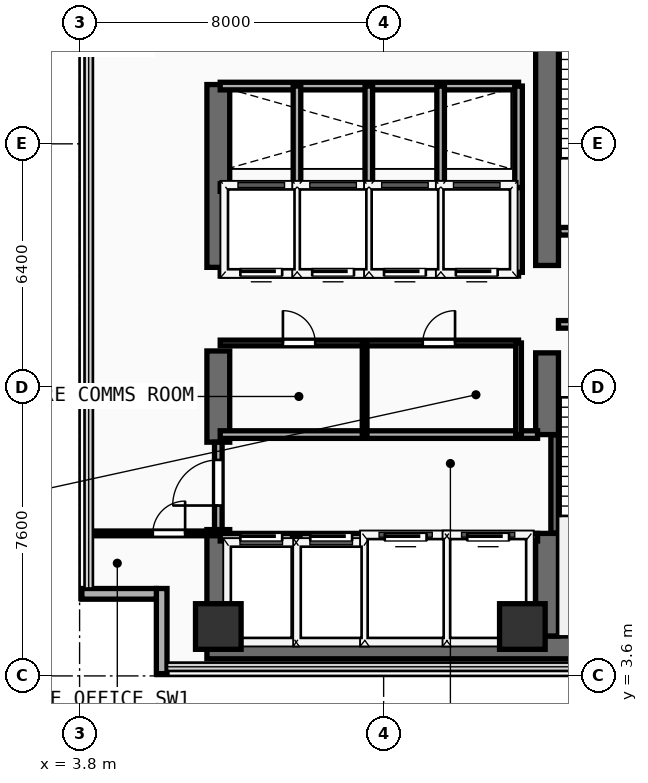
"""IFC4 building model, lengths in metres.
Left out: names, types, materials, properties, quantities, classifications, styles, units other than length and angle.
Written with IfcOpenShell. Run it as: python <this file> out.ifc"""

import sys

from ifc_helpers import new_model, si_unit, direction, frame, frame_2d, origin, origin_2d, place, context, subcontext, project, spatial, rectangle, extrude, element, fill, save


model = new_model("IFC4")
c1 = context("Model", 3, precision=1e-05, world=origin(), true_north=direction((0.0, 1.0)))
c2 = subcontext(c1, "Body", "Model", "MODEL_VIEW")
j1 = project(units=[si_unit("LENGTHUNIT", "METRE"), si_unit("PLANEANGLEUNIT", "RADIAN")], contexts=[c1])
p1 = place(None, origin())
s1 = spatial("IfcSite", under=j1, at=p1, CompositionType="ELEMENT")
p2 = place(p1, origin())
s2 = spatial("IfcBuilding", under=s1, at=p2, CompositionType="ELEMENT")
p3 = place(p2, frame((0.0, 0.0, 153.8)))
s3 = spatial("IfcBuildingStorey", under=s2, at=p3, CompositionType="ELEMENT", Elevation=153.8)
p4 = place(p3, frame((7.15, 4.35, 0.0), z_axis=(0.0, 0.0, 1.0), x_axis=(1.0, 0.0, 0.0)))
e1 = element("IfcWall", 1, at=p4, inside=s3, PredefinedType="SHEAR", context=c2, shape_type="SweptSolid", body=[
    extrude(rectangle(XDim=13.95, YDim=0.6, at=frame_2d((6.975, 0.0))), origin(), (0.0, 0.0, 1.0), 3.56),
])
p5 = place(p3, frame((7.45, 4.65, 0.0), z_axis=(0.0, 0.0, 1.0), x_axis=(0.0, 1.0, 0.0)))
e2 = element("IfcWall", 2, at=p5, inside=s3, PredefinedType="SHEAR", context=c2, shape_type="SweptSolid", body=[
    extrude(rectangle(XDim=2.8, YDim=0.6, at=frame_2d((1.4, 0.0))), origin(), (0.0, 0.0, 1.0), 3.56),
])
p6 = place(p3, frame((7.45, 9.75, 0.0), z_axis=(0.0, 0.0, 1.0), x_axis=(0.0, 1.0, 0.0)))
e3 = element("IfcWall", 3, at=p6, inside=s3, PredefinedType="SHEAR", context=c2, shape_type="SweptSolid", body=[
    extrude(rectangle(XDim=2.4, YDim=0.6, at=frame_2d((1.2, 0.0))), origin(), (0.0, 0.0, 1.0), 3.56),
])
p7 = place(p3, frame((7.45, 14.35, 0.0), z_axis=(0.0, 0.0, 1.0), x_axis=(0.0, 1.0, 0.0)))
e4 = element("IfcWall", 4, at=p7, inside=s3, PredefinedType="SHEAR", context=c2, shape_type="SweptSolid", body=[
    extrude(rectangle(XDim=4.81, YDim=0.6, at=frame_2d((2.405, 0.0))), origin(), (0.0, 0.0, 1.0), 3.56),
])
p8 = place(p3, frame((16.1, 4.65, 0.0), z_axis=(0.0, 0.0, 1.0), x_axis=(0.0, 1.0, 0.0)))
e5 = element("IfcWall", 5, at=p8, inside=s3, PredefinedType="SHEAR", context=c2, shape_type="SweptSolid", body=[
    extrude(rectangle(XDim=2.7, YDim=0.6, at=frame_2d((1.35, 0.0))), origin(), (0.0, 0.0, 1.0), 3.56),
])
p9 = place(p3, frame((16.1, 9.95, 0.0), z_axis=(0.0, 0.0, 1.0), x_axis=(0.0, 1.0, 0.0)))
e6 = element("IfcWall", 6, at=p9, inside=s3, PredefinedType="SHEAR", context=c2, shape_type="SweptSolid", body=[
    extrude(rectangle(XDim=2.15, YDim=0.6, at=frame_2d((1.075, 0.0))), origin(), (0.0, 0.0, 1.0), 3.56),
])
p10 = place(p3, frame((16.1, 14.4, 0.0), z_axis=(0.0, 0.0, 1.0), x_axis=(0.0, 1.0, 0.0)))
e7 = element("IfcWall", 7, at=p10, inside=s3, PredefinedType="SHEAR", context=c2, shape_type="SweptSolid", body=[
    extrude(rectangle(XDim=9.1, YDim=0.6, at=frame_2d((4.55, 0.0))), origin(), (0.0, 0.0, 1.0), 3.56),
])
for number, where, z_axis, x_axis in (
    (8, (7.45, 4.9, 0.0), (0.0, 0.0, 1.0), (1.0, 0.0, 0.0)),
    (9, (15.45, 4.9, 0.0), (0.0, 0.0, 1.0), (1.0, 0.0, 0.0)),
):
    element("IfcColumn", number, at=place(p3, frame(where, z_axis=z_axis, x_axis=x_axis)), inside=s3, PredefinedType="COLUMN", context=c2, shape_type="SweptSolid", body=[
        extrude(rectangle(XDim=1.2, YDim=1.2, at=origin_2d()), origin(), (0.0, 0.0, 1.0), 3.56),
    ])
p11 = place(p3, frame((5.96, 3.66, 0.0), z_axis=(0.0, 0.0, 1.0), x_axis=(0.0, 1.0, 0.0)))
e10 = element("IfcWall", 10, at=p11, inside=s3, PredefinedType="SOLIDWALL", context=c2, shape_type="SweptSolid", body=[
    extrude(rectangle(XDim=2.24, YDim=0.28, at=frame_2d((1.12, 0.0))), origin(), (0.0, 0.0, 1.0), 3.56),
])
p12 = place(p3, frame((3.86, 5.76, 0.0), z_axis=(0.0, 0.0, 1.0), x_axis=(1.0, 0.0, 0.0)))
e11 = element("IfcWall", 11, at=p12, inside=s3, PredefinedType="SOLIDWALL", context=c2, shape_type="SweptSolid", body=[
    extrude(rectangle(XDim=1.96, YDim=0.28, at=frame_2d((0.98, 0.0))), origin(), (0.0, 0.0, 1.0), 3.56),
])
p13 = place(p3, frame((16.3, 7.36, 0.0), z_axis=(0.0, 0.0, 1.0), x_axis=(0.0, 1.0, 0.0)))
e12 = element("IfcWall", 12, at=p13, inside=s3, PredefinedType="SHEAR", context=c2, shape_type="SweptSolid", body=[
    extrude(rectangle(XDim=2.58, YDim=0.2, at=frame_2d((1.29, 0.0))), origin(), (0.0, 0.0, 1.0), 3.56),
])
p14 = place(p3, frame((16.4, 12.85, 0.0), z_axis=(0.0, 0.0, 1.0), x_axis=(1.0, 0.0, 0.0)))
e13 = element("IfcWall", 13, at=p14, inside=s3, PredefinedType="PARTITIONING", context=c2, shape_type="SweptSolid", body=[
    extrude(rectangle(XDim=3.96, YDim=0.2, at=frame_2d((1.98, 0.0))), origin(), (0.0, 0.0, 1.0), 3.56),
])
p15 = place(p14, frame((1.304, 0.0, 0.0)))
e14 = element("IfcOpeningElement", 14, at=p15, cuts=e13, PredefinedType="OPENING", context=c2, shape_type="SweptSolid", body=[
    extrude(rectangle(XDim=1.1, YDim=2.2, at=frame_2d((0.55, 1.1))), frame((0.0, 0.11, 0.0), z_axis=(0.0, -1.0, 0.0), x_axis=(1.0, 0.0, 0.0)), (0.0, 0.0, 1.0), 0.22),
])
p16 = place(p3, frame((16.41, 15.3, 0.0), z_axis=(0.0, 0.0, 1.0), x_axis=(1.0, 0.0, 0.0)))
e15 = element("IfcWall", 15, at=p16, inside=s3, PredefinedType="PARTITIONING", context=c2, shape_type="SweptSolid", body=[
    extrude(rectangle(XDim=3.95, YDim=0.2, at=frame_2d((1.975, 0.0))), origin(), (0.0, 0.0, 1.0), 3.56),
])
p17 = place(p16, frame((1.294, 0.0, 0.0)))
e16 = element("IfcOpeningElement", 16, at=p17, cuts=e15, PredefinedType="OPENING", context=c2, shape_type="SweptSolid", body=[
    extrude(rectangle(XDim=1.1, YDim=2.2, at=frame_2d((0.55, 1.1))), frame((0.0, 0.11, 0.0), z_axis=(0.0, -1.0, 0.0), x_axis=(1.0, 0.0, 0.0)), (0.0, 0.0, 1.0), 0.22),
])
p18 = place(p3, frame((7.5, 7.25, 0.0), z_axis=(0.0, 0.0, 1.0), x_axis=(1.0, 0.0, 0.0)))
e17 = element("IfcWall", 17, at=p18, inside=s3, PredefinedType="PARTITIONING", context=c2, shape_type="SweptSolid", body=[
    extrude(rectangle(XDim=8.35, YDim=0.2, at=frame_2d((4.175, 0.0))), origin(), (0.0, 0.0, 1.0), 3.56),
])
p19 = place(p18, frame((0.53, 0.0, 0.0)))
e18 = element("IfcOpeningElement", 18, at=p19, cuts=e17, PredefinedType="OPENING", context=c2, shape_type="SweptSolid", body=[
    extrude(rectangle(XDim=1.1, YDim=2.2, at=frame_2d((0.55, 1.1))), frame((0.0, 0.11, 0.0), z_axis=(0.0, -1.0, 0.0), x_axis=(1.0, 0.0, 0.0)), (0.0, 0.0, 1.0), 0.22),
])
p20 = place(p18, frame((2.37, 0.0, 0.0)))
e19 = element("IfcOpeningElement", 19, at=p20, cuts=e17, PredefinedType="OPENING", context=c2, shape_type="SweptSolid", body=[
    extrude(rectangle(XDim=1.1, YDim=2.2, at=frame_2d((0.55, 1.1))), frame((0.0, 0.11, 0.0), z_axis=(0.0, -1.0, 0.0), x_axis=(1.0, 0.0, 0.0)), (0.0, 0.0, 1.0), 0.22),
])
p21 = place(p18, frame((4.33, 0.0, 0.0)))
e20 = element("IfcOpeningElement", 20, at=p21, cuts=e17, PredefinedType="OPENING", context=c2, shape_type="SweptSolid", body=[
    extrude(rectangle(XDim=1.1, YDim=2.2, at=frame_2d((0.55, 1.1))), frame((0.0, 0.11, 0.0), z_axis=(0.0, -1.0, 0.0), x_axis=(1.0, 0.0, 0.0)), (0.0, 0.0, 1.0), 0.22),
])
p22 = place(p18, frame((6.5, 0.0, 0.0)))
e21 = element("IfcOpeningElement", 21, at=p22, cuts=e17, PredefinedType="OPENING", context=c2, shape_type="SweptSolid", body=[
    extrude(rectangle(XDim=1.1, YDim=2.2, at=frame_2d((0.55, 1.1))), frame((0.0, 0.11, 0.0), z_axis=(0.0, -1.0, 0.0), x_axis=(1.0, 0.0, 0.0)), (0.0, 0.0, 1.0), 0.22),
])
p23 = place(p3, frame((7.5, 9.95, 0.0), z_axis=(0.0, 0.0, 1.0), x_axis=(1.0, 0.0, 0.0)))
e22 = element("IfcWall", 22, at=p23, inside=s3, PredefinedType="PARTITIONING", context=c2, shape_type="SweptSolid", body=[
    extrude(rectangle(XDim=8.35, YDim=0.2, at=frame_2d((4.175, 0.0))), origin(), (0.0, 0.0, 1.0), 3.56),
])
for number, where, z_axis, x_axis in (
    (23, (9.5, 4.45, 0.0), (0.0, 0.0, 1.0), (0.0, 1.0, 0.0)),
    (24, (11.36, 4.45, 0.0), (0.0, 0.0, 1.0), (0.0, 1.0, 0.0)),
    (25, (13.46, 4.45, 0.0), (0.0, 0.0, 1.0), (0.0, 1.0, 0.0)),
):
    element("IfcWall", number, at=place(p3, frame(where, z_axis=z_axis, x_axis=x_axis)), inside=s3, PredefinedType="PARTITIONING", context=c2, shape_type="SweptSolid", body=[
        extrude(rectangle(XDim=2.8, YDim=0.2, at=frame_2d((1.4, 0.0))), origin(), (0.0, 0.0, 1.0), 3.56),
    ])
p24 = place(p3, frame((7.45, 7.45, 0.0), z_axis=(0.0, 0.0, 1.0), x_axis=(0.0, 1.0, 0.0)))
e26 = element("IfcWall", 26, at=p24, inside=s3, PredefinedType="PARTITIONING", context=c2, shape_type="SweptSolid", body=[
    extrude(rectangle(XDim=2.3, YDim=0.2, at=frame_2d((1.15, 0.0))), origin(), (0.0, 0.0, 1.0), 2.54),
])
p25 = place(p24, frame((0.633, 0.0, 0.0)))
e27 = element("IfcOpeningElement", 27, at=p25, cuts=e26, PredefinedType="OPENING", context=c2, shape_type="SweptSolid", body=[
    extrude(rectangle(XDim=1.2, YDim=2.25, at=frame_2d((0.6, 1.125))), frame((0.0, 0.11, 0.0), z_axis=(0.0, -1.0, 0.0), x_axis=(1.0, 0.0, 0.0)), (0.0, 0.0, 1.0), 0.22),
])
p26 = place(p3, frame((7.5, 12.36, 0.0), z_axis=(0.0, 0.0, 1.0), x_axis=(1.0, 0.0, 0.0)))
e28 = element("IfcWall", 28, at=p26, inside=s3, PredefinedType="PARTITIONING", context=c2, shape_type="SweptSolid", body=[
    extrude(rectangle(XDim=7.85, YDim=0.15, at=frame_2d((3.925, 0.0))), origin(), (0.0, 0.0, 1.0), 3.56),
])
p27 = place(p26, frame((1.65, 0.0, 0.0)))
e29 = element("IfcOpeningElement", 29, at=p27, cuts=e28, PredefinedType="OPENING", context=c2, shape_type="SweptSolid", body=[
    extrude(rectangle(XDim=0.85, YDim=2.15, at=frame_2d((0.425, 1.075))), frame((0.0, 0.085, 0.0), z_axis=(0.0, -1.0, 0.0), x_axis=(1.0, 0.0, 0.0)), (0.0, 0.0, 1.0), 0.17),
])
p28 = place(p26, frame((5.329, 0.0, 0.0)))
e30 = element("IfcOpeningElement", 30, at=p28, cuts=e28, PredefinedType="OPENING", context=c2, shape_type="SweptSolid", body=[
    extrude(rectangle(XDim=0.85, YDim=2.15, at=frame_2d((0.425, 1.075))), frame((0.0, 0.085, 0.0), z_axis=(0.0, -1.0, 0.0), x_axis=(1.0, 0.0, 0.0)), (0.0, 0.0, 1.0), 0.17),
])
p29 = place(p3, frame((15.35, 9.95, 0.0), z_axis=(0.0, 0.0, 1.0), x_axis=(0.0, 1.0, 0.0)))
e31 = element("IfcWall", 31, at=p29, inside=s3, PredefinedType="PARTITIONING", context=c2, shape_type="SweptSolid", body=[
    extrude(rectangle(XDim=2.41, YDim=0.15, at=frame_2d((1.205, 0.0))), origin(), (0.0, 0.0, 1.0), 3.56),
])
p30 = place(p3, frame((11.3, 9.95, 0.0), z_axis=(0.0, 0.0, 1.0), x_axis=(0.0, 1.0, 0.0)))
e32 = element("IfcWall", 32, at=p30, inside=s3, PredefinedType="PARTITIONING", context=c2, shape_type="SweptSolid", body=[
    extrude(rectangle(XDim=2.41, YDim=0.125, at=frame_2d((1.205, 0.0))), origin(), (0.0, 0.0, 1.0), 3.56),
])
p31 = place(p3, frame((7.5, 14.22, 0.0), z_axis=(0.0, 0.0, 1.0), x_axis=(1.0, 0.0, 0.0)))
e33 = element("IfcWall", 33, at=p31, inside=s3, PredefinedType="PARTITIONING", context=c2, shape_type="SweptSolid", body=[
    extrude(rectangle(XDim=7.85, YDim=0.2, at=frame_2d((3.925, 0.0))), origin(), (0.0, 0.0, 1.0), 3.56),
])
p32 = place(p31, frame((0.53, 0.0, 0.0)))
e34 = element("IfcOpeningElement", 34, at=p32, cuts=e33, PredefinedType="OPENING", context=c2, shape_type="SweptSolid", body=[
    extrude(rectangle(XDim=1.1, YDim=2.2, at=frame_2d((0.55, 1.1))), frame((0.0, 0.11, 0.0), z_axis=(0.0, -1.0, 0.0), x_axis=(1.0, 0.0, 0.0)), (0.0, 0.0, 1.0), 0.22),
])
p33 = place(p31, frame((2.42, 0.0, 0.0)))
e35 = element("IfcOpeningElement", 35, at=p33, cuts=e33, PredefinedType="OPENING", context=c2, shape_type="SweptSolid", body=[
    extrude(rectangle(XDim=1.1, YDim=2.2, at=frame_2d((0.55, 1.1))), frame((0.0, 0.11, 0.0), z_axis=(0.0, -1.0, 0.0), x_axis=(1.0, 0.0, 0.0)), (0.0, 0.0, 1.0), 0.22),
])
p34 = place(p31, frame((4.31, 0.0, 0.0)))
e36 = element("IfcOpeningElement", 36, at=p34, cuts=e33, PredefinedType="OPENING", context=c2, shape_type="SweptSolid", body=[
    extrude(rectangle(XDim=1.1, YDim=2.2, at=frame_2d((0.55, 1.1))), frame((0.0, 0.11, 0.0), z_axis=(0.0, -1.0, 0.0), x_axis=(1.0, 0.0, 0.0)), (0.0, 0.0, 1.0), 0.22),
])
p35 = place(p31, frame((6.2, 0.0, 0.0)))
e37 = element("IfcOpeningElement", 37, at=p35, cuts=e33, PredefinedType="OPENING", context=c2, shape_type="SweptSolid", body=[
    extrude(rectangle(XDim=1.1, YDim=2.2, at=frame_2d((0.55, 1.1))), frame((0.0, 0.11, 0.0), z_axis=(0.0, -1.0, 0.0), x_axis=(1.0, 0.0, 0.0)), (0.0, 0.0, 1.0), 0.22),
])
p36 = place(p3, frame((7.5, 16.45, 0.0), z_axis=(0.0, 0.0, 1.0), x_axis=(1.0, 0.0, 0.0)))
e38 = element("IfcWall", 38, at=p36, inside=s3, PredefinedType="PARTITIONING", context=c2, shape_type="SweptSolid", body=[
    extrude(rectangle(XDim=7.85, YDim=0.2, at=frame_2d((3.925, 0.0))), origin(), (0.0, 0.0, 1.0), 3.56),
])
for number, where, z_axis, x_axis in (
    (39, (15.35, 14.22, 0.0), (0.0, 0.0, 1.0), (0.0, 1.0, 0.0)),
    (40, (9.52, 14.22, 0.0), (0.0, 0.0, 1.0), (0.0, 1.0, 0.0)),
    (41, (11.41, 14.22, 0.0), (0.0, 0.0, 1.0), (0.0, 1.0, 0.0)),
    (42, (13.3, 14.22, 0.0), (0.0, 0.0, 1.0), (0.0, 1.0, 0.0)),
):
    element("IfcWall", number, at=place(p3, frame(where, z_axis=z_axis, x_axis=x_axis)), inside=s3, PredefinedType="PARTITIONING", context=c2, shape_type="SweptSolid", body=[
        extrude(rectangle(XDim=2.23, YDim=0.2, at=frame_2d((1.115, 0.0))), origin(), (0.0, 0.0, 1.0), 3.56),
    ])
p37 = place(p3, frame((7.5, 19.12, 0.0), z_axis=(0.0, 0.0, 1.0), x_axis=(1.0, 0.0, 0.0)))
e43 = element("IfcWall", 43, at=p37, inside=s3, PredefinedType="PARTITIONING", context=c2, shape_type="SweptSolid", body=[
    extrude(rectangle(XDim=7.85, YDim=0.2, at=frame_2d((3.925, 0.0))), origin(), (0.0, 0.0, 1.0), 3.56),
])
for number, where, z_axis, x_axis in (
    (44, (15.35, 16.45, 0.0), (0.0, 0.0, 1.0), (0.0, 1.0, 0.0)),
    (45, (9.52, 16.45, 0.0), (0.0, 0.0, 1.0), (0.0, 1.0, 0.0)),
    (46, (11.41, 16.45, 0.0), (0.0, 0.0, 1.0), (0.0, 1.0, 0.0)),
    (47, (13.3, 16.45, 0.0), (0.0, 0.0, 1.0), (0.0, 1.0, 0.0)),
):
    element("IfcWall", number, at=place(p3, frame(where, z_axis=z_axis, x_axis=x_axis)), inside=s3, PredefinedType="PARTITIONING", context=c2, shape_type="SweptSolid", body=[
        extrude(rectangle(XDim=2.67, YDim=0.2, at=frame_2d((1.335, 0.0))), origin(), (0.0, 0.0, 1.0), 3.56),
    ])
p38 = place(p3, frame((4.04, 7.35, 0.0), z_axis=(0.0, 0.0, 1.0), x_axis=(1.0, 0.0, 0.0)))
e48 = element("IfcWall", 48, at=p38, inside=s3, PredefinedType="PARTITIONING", context=c2, shape_type="SweptSolid", body=[
    extrude(rectangle(XDim=3.36, YDim=0.125, at=frame_2d((1.68, 0.0))), origin(), (0.0, 0.0, 1.0), 3.56),
])
p39 = place(p38, frame((1.687, 0.0, 0.0)))
e49 = element("IfcOpeningElement", 49, at=p39, cuts=e48, PredefinedType="OPENING", context=c2, shape_type="SweptSolid", body=[
    extrude(rectangle(XDim=0.85, YDim=2.15, at=frame_2d((0.425, 1.075))), frame((0.0, 0.073, 0.0), z_axis=(0.0, -1.0, 0.0), x_axis=(1.0, 0.0, 0.0)), (0.0, 0.0, 1.0), 0.145),
])
p40 = place(p19, origin())
e50 = element("IfcDoor", 50, at=p40, inside=s3, OperationType="SLIDING_TO_LEFT", PredefinedType="DOOR", context=c2, shape_type="SweptSolid", body=[
    extrude(rectangle(XDim=1.1, YDim=2.2, at=frame_2d((0.55, 1.1))), frame((0.0, 0.025, 0.0), z_axis=(0.0, -1.0, 0.0), x_axis=(1.0, 0.0, 0.0)), (0.0, 0.0, 1.0), 0.05),
])
fill(e18, e50)
p41 = place(p20, origin())
e51 = element("IfcDoor", 51, at=p41, inside=s3, OperationType="SLIDING_TO_LEFT", PredefinedType="DOOR", context=c2, shape_type="SweptSolid", body=[
    extrude(rectangle(XDim=1.1, YDim=2.2, at=frame_2d((0.55, 1.1))), frame((0.0, 0.025, 0.0), z_axis=(0.0, -1.0, 0.0), x_axis=(1.0, 0.0, 0.0)), (0.0, 0.0, 1.0), 0.05),
])
fill(e19, e51)
p42 = place(p21, origin())
e52 = element("IfcDoor", 52, at=p42, inside=s3, OperationType="SLIDING_TO_LEFT", PredefinedType="DOOR", context=c2, shape_type="SweptSolid", body=[
    extrude(rectangle(XDim=1.1, YDim=2.2, at=frame_2d((0.55, 1.1))), frame((0.0, 0.025, 0.0), z_axis=(0.0, -1.0, 0.0), x_axis=(1.0, 0.0, 0.0)), (0.0, 0.0, 1.0), 0.05),
])
fill(e20, e52)
p43 = place(p22, origin())
e53 = element("IfcDoor", 53, at=p43, inside=s3, OperationType="SLIDING_TO_LEFT", PredefinedType="DOOR", context=c2, shape_type="SweptSolid", body=[
    extrude(rectangle(XDim=1.1, YDim=2.2, at=frame_2d((0.55, 1.1))), frame((0.0, 0.025, 0.0), z_axis=(0.0, -1.0, 0.0), x_axis=(1.0, 0.0, 0.0)), (0.0, 0.0, 1.0), 0.05),
])
fill(e21, e53)
p44 = place(p25, frame((1.2, 0.0, 0.0), z_axis=(0.0, 0.0, 1.0), x_axis=(-1.0, 0.0, 0.0)))
e54 = element("IfcDoor", 54, at=p44, inside=s3, OperationType="SINGLE_SWING_RIGHT", PredefinedType="DOOR", context=c2, shape_type="SweptSolid", body=[
    extrude(rectangle(XDim=1.2, YDim=2.25, at=frame_2d((0.6, 1.125))), frame((0.0, 0.025, 0.0), z_axis=(0.0, -1.0, 0.0), x_axis=(1.0, 0.0, 0.0)), (0.0, 0.0, 1.0), 0.05),
])
fill(e27, e54)
p45 = place(p27, origin())
e55 = element("IfcDoor", 55, at=p45, inside=s3, OperationType="SINGLE_SWING_LEFT", PredefinedType="DOOR", context=c2, shape_type="SweptSolid", body=[
    extrude(rectangle(XDim=0.85, YDim=2.15, at=frame_2d((0.425, 1.075))), frame((0.0, 0.025, 0.0), z_axis=(0.0, -1.0, 0.0), x_axis=(1.0, 0.0, 0.0)), (0.0, 0.0, 1.0), 0.05),
])
fill(e29, e55)
p46 = place(p28, origin())
e56 = element("IfcDoor", 56, at=p46, inside=s3, OperationType="SINGLE_SWING_RIGHT", PredefinedType="DOOR", context=c2, shape_type="SweptSolid", body=[
    extrude(rectangle(XDim=0.85, YDim=2.15, at=frame_2d((0.425, 1.075))), frame((0.0, 0.025, 0.0), z_axis=(0.0, -1.0, 0.0), x_axis=(1.0, 0.0, 0.0)), (0.0, 0.0, 1.0), 0.05),
])
fill(e30, e56)
p47 = place(p32, frame((1.1, 0.0, 0.0), z_axis=(0.0, 0.0, 1.0), x_axis=(-1.0, 0.0, 0.0)))
e57 = element("IfcDoor", 57, at=p47, inside=s3, OperationType="SLIDING_TO_LEFT", PredefinedType="DOOR", context=c2, shape_type="SweptSolid", body=[
    extrude(rectangle(XDim=1.1, YDim=2.2, at=frame_2d((0.55, 1.1))), frame((0.0, 0.025, 0.0), z_axis=(0.0, -1.0, 0.0), x_axis=(1.0, 0.0, 0.0)), (0.0, 0.0, 1.0), 0.05),
])
fill(e34, e57)
p48 = place(p33, frame((1.1, 0.0, 0.0), z_axis=(0.0, 0.0, 1.0), x_axis=(-1.0, 0.0, 0.0)))
e58 = element("IfcDoor", 58, at=p48, inside=s3, OperationType="SLIDING_TO_LEFT", PredefinedType="DOOR", context=c2, shape_type="SweptSolid", body=[
    extrude(rectangle(XDim=1.1, YDim=2.2, at=frame_2d((0.55, 1.1))), frame((0.0, 0.025, 0.0), z_axis=(0.0, -1.0, 0.0), x_axis=(1.0, 0.0, 0.0)), (0.0, 0.0, 1.0), 0.05),
])
fill(e35, e58)
p49 = place(p34, frame((1.1, 0.0, 0.0), z_axis=(0.0, 0.0, 1.0), x_axis=(-1.0, 0.0, 0.0)))
e59 = element("IfcDoor", 59, at=p49, inside=s3, OperationType="SLIDING_TO_LEFT", PredefinedType="DOOR", context=c2, shape_type="SweptSolid", body=[
    extrude(rectangle(XDim=1.1, YDim=2.2, at=frame_2d((0.55, 1.1))), frame((0.0, 0.025, 0.0), z_axis=(0.0, -1.0, 0.0), x_axis=(1.0, 0.0, 0.0)), (0.0, 0.0, 1.0), 0.05),
])
fill(e36, e59)
p50 = place(p35, frame((1.1, 0.0, 0.0), z_axis=(0.0, 0.0, 1.0), x_axis=(-1.0, 0.0, 0.0)))
e60 = element("IfcDoor", 60, at=p50, inside=s3, OperationType="SLIDING_TO_LEFT", PredefinedType="DOOR", context=c2, shape_type="SweptSolid", body=[
    extrude(rectangle(XDim=1.1, YDim=2.2, at=frame_2d((0.55, 1.1))), frame((0.0, 0.025, 0.0), z_axis=(0.0, -1.0, 0.0), x_axis=(1.0, 0.0, 0.0)), (0.0, 0.0, 1.0), 0.05),
])
fill(e37, e60)
p51 = place(p39, origin())
e61 = element("IfcDoor", 61, at=p51, inside=s3, OperationType="SINGLE_SWING_RIGHT", PredefinedType="DOOR", context=c2, shape_type="SweptSolid", body=[
    extrude(rectangle(XDim=0.85, YDim=2.15, at=frame_2d((0.425, 1.075))), frame((0.0, 0.025, 0.0), z_axis=(0.0, -1.0, 0.0), x_axis=(1.0, 0.0, 0.0)), (0.0, 0.0, 1.0), 0.05),
])
fill(e49, e61)
save(model, sys.argv[1])
